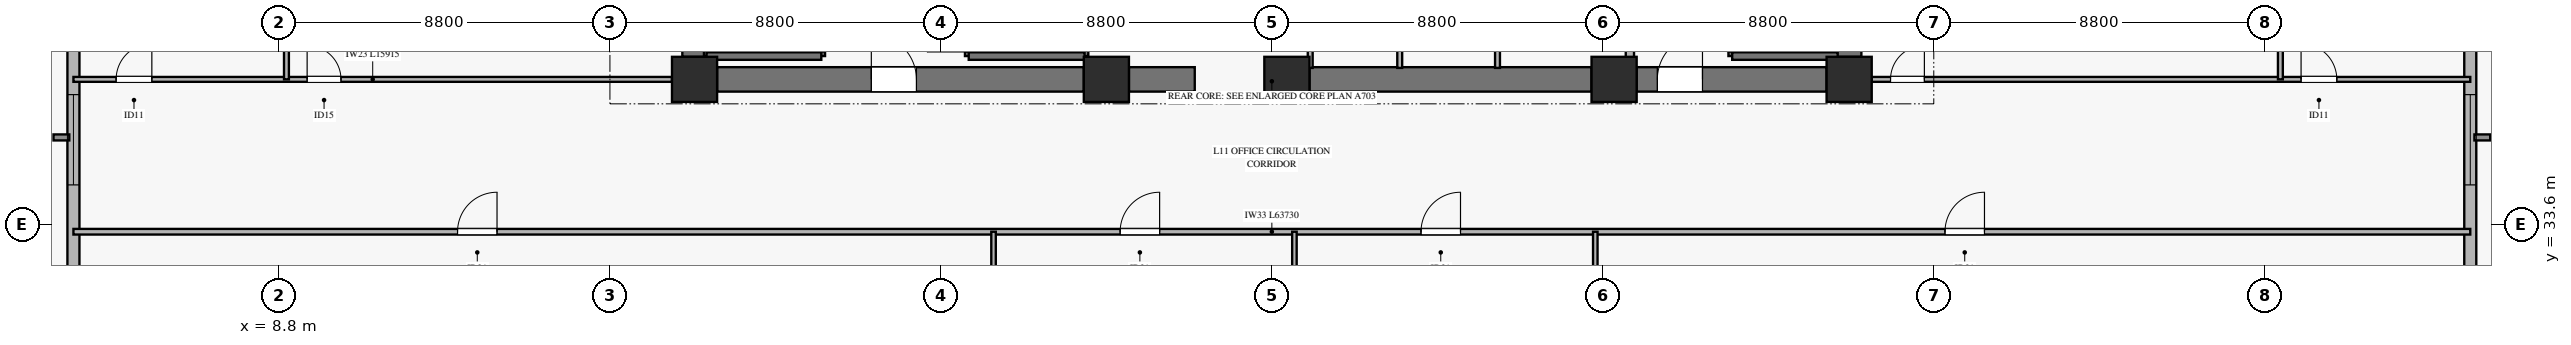
"""IFC4 building model, lengths in metres.
Left out: names, types, materials, properties, quantities, classifications, styles, units other than length and angle.
Written with IfcOpenShell. Run it as: python <this file> out.ifc"""

import sys

from ifc_helpers import new_model, si_unit, direction, frame, frame_2d, origin, origin_2d, place, context, subcontext, project, spatial, rectangle, extrude, source, transform, mapped, element, fill, save


model = new_model("IFC4")
c1 = context("Model", 3, precision=1e-05, world=origin(), true_north=direction((0.0, 1.0)))
c2 = subcontext(c1, "Body", "Model", "MODEL_VIEW")
j1 = project(units=[si_unit("LENGTHUNIT", "METRE"), si_unit("PLANEANGLEUNIT", "RADIAN")], contexts=[c1])
p1 = place(None, origin())
s1 = spatial("IfcSite", under=j1, at=p1, CompositionType="ELEMENT")
p2 = place(p1, origin())
s2 = spatial("IfcBuilding", under=s1, at=p2, CompositionType="ELEMENT")
p3 = place(p2, frame((0.0, 0.0, 44.9)))
s3 = spatial("IfcBuildingStorey", under=s2, at=p3, CompositionType="ELEMENT", Elevation=44.9)
m1 = source(origin(), c2, "Body", "SweptSolid", [
    extrude(rectangle(XDim=1.2, YDim=1.2, at=origin_2d()), origin(), (0.0, 0.0, 1.0), 3.62),
])
for number, where, z_axis, x_axis in (
    (1, (19.85, 37.45, 0.0), (0.0, 0.0, 1.0), (1.0, 0.0, 0.0)),
    (2, (30.8, 37.45, 0.0), (0.0, 0.0, 1.0), (1.0, 0.0, 0.0)),
    (3, (35.6, 37.45, 0.0), (0.0, 0.0, 1.0), (1.0, 0.0, 0.0)),
    (4, (44.3, 37.45, 0.0), (0.0, 0.0, 1.0), (1.0, 0.0, 0.0)),
    (5, (50.55, 37.45, 0.0), (0.0, 0.0, 1.0), (1.0, 0.0, 0.0)),
):
    element("IfcColumn", number, at=place(p3, frame(where, z_axis=z_axis, x_axis=x_axis)), inside=s3, PredefinedType="PILASTER", context=c2, shape_type="MappedRepresentation", body=[
        mapped(m1, transform((0.0, 0.0, 0.0), x_axis=(1.0, 0.0, 0.0), y_axis=(0.0, 1.0, 0.0), z_axis=(0.0, 0.0, 1.0), scale=1.0)),
    ])
p4 = place(p3, frame((20.45, 37.45, 0.0), z_axis=(0.0, 0.0, 1.0), x_axis=(1.0, 0.0, 0.0)))
e6 = element("IfcWall", 6, at=p4, inside=s3, PredefinedType="SHEAR", context=c2, shape_type="SweptSolid", body=[
    extrude(rectangle(XDim=9.75, YDim=0.65, at=frame_2d((4.875, 0.0))), origin(), (0.0, 0.0, 1.0), 3.62),
])
p5 = place(p4, frame((4.1, 0.0, 0.0)))
e7 = element("IfcOpeningElement", 7, at=p5, cuts=e6, PredefinedType="OPENING", context=c2, shape_type="SweptSolid", body=[
    extrude(rectangle(XDim=1.2, YDim=2.15, at=frame_2d((0.6, 1.075))), frame((0.0, 0.335, 0.0), z_axis=(0.0, -1.0, 0.0), x_axis=(1.0, 0.0, 0.0)), (0.0, 0.0, 1.0), 0.67),
])
p6 = place(p3, frame((31.4, 37.45, 0.0), z_axis=(0.0, 0.0, 1.0), x_axis=(1.0, 0.0, 0.0)))
e8 = element("IfcWall", 8, at=p6, inside=s3, PredefinedType="SHEAR", context=c2, shape_type="SweptSolid", body=[
    extrude(rectangle(XDim=1.75, YDim=0.65, at=frame_2d((0.875, 0.0))), origin(), (0.0, 0.0, 1.0), 3.62),
])
p7 = place(p3, frame((36.2, 37.45, 0.0), z_axis=(0.0, 0.0, 1.0), x_axis=(1.0, 0.0, 0.0)))
e9 = element("IfcWall", 9, at=p7, inside=s3, PredefinedType="SHEAR", context=c2, shape_type="SweptSolid", body=[
    extrude(rectangle(XDim=7.5, YDim=0.65, at=frame_2d((3.75, 0.0))), origin(), (0.0, 0.0, 1.0), 3.62),
])
p8 = place(p3, frame((44.9, 37.45, 0.0), z_axis=(0.0, 0.0, 1.0), x_axis=(1.0, 0.0, 0.0)))
e10 = element("IfcWall", 10, at=p8, inside=s3, PredefinedType="SHEAR", context=c2, shape_type="SweptSolid", body=[
    extrude(rectangle(XDim=5.05, YDim=0.65, at=frame_2d((2.525, 0.0))), origin(), (0.0, 0.0, 1.0), 3.62),
])
p9 = place(p8, frame((0.55, 0.0, 0.0)))
e11 = element("IfcOpeningElement", 11, at=p9, cuts=e10, PredefinedType="OPENING", context=c2, shape_type="SweptSolid", body=[
    extrude(rectangle(XDim=1.2, YDim=2.15, at=frame_2d((0.6, 1.075))), frame((0.0, 0.335, 0.0), z_axis=(0.0, -1.0, 0.0), x_axis=(1.0, 0.0, 0.0)), (0.0, 0.0, 1.0), 0.67),
])
for number, where, z_axis, x_axis in (
    (12, (19.85, 38.05, 0.0), (0.0, 0.0, 1.0), (0.0, 1.0, 0.0)),
    (13, (50.55, 38.05, 0.0), (0.0, 0.0, 1.0), (0.0, 1.0, 0.0)),
):
    element("IfcWall", number, at=place(p3, frame(where, z_axis=z_axis, x_axis=x_axis)), inside=s3, PredefinedType="SHEAR", context=c2, shape_type="SweptSolid", body=[
        extrude(rectangle(XDim=7.9, YDim=0.65, at=frame_2d((3.95, 0.0))), origin(), (0.0, 0.0, 1.0), 3.62),
    ])
p10 = place(p3, frame((3.335, 25.513, 0.0), z_axis=(0.0, 0.0, 1.0), x_axis=(0.0, 1.0, 0.0)))
e14 = element("IfcWall", 14, at=p10, inside=s3, PredefinedType="SOLIDWALL", context=c2, shape_type="SweptSolid", body=[
    extrude(rectangle(XDim=17.413, YDim=0.32, at=frame_2d((8.707, 0.0))), origin(), (0.0, 0.0, 1.0), 3.1),
])
p11 = place(p10, frame((9.132, 0.0, 0.45)))
e15 = element("IfcOpeningElement", 15, at=p11, cuts=e14, PredefinedType="OPENING", context=c2, shape_type="SweptSolid", body=[
    extrude(rectangle(XDim=2.4, YDim=2.1, at=frame_2d((1.2, 1.05))), frame((0.0, 0.17, 0.0), z_axis=(0.0, -1.0, 0.0), x_axis=(1.0, 0.0, 0.0)), (0.0, 0.0, 1.0), 0.34),
])
p12 = place(p3, frame((67.065, 25.513, 0.0), z_axis=(0.0, 0.0, 1.0), x_axis=(0.0, 1.0, 0.0)))
e16 = element("IfcWall", 16, at=p12, inside=s3, PredefinedType="SOLIDWALL", context=c2, shape_type="SweptSolid", body=[
    extrude(rectangle(XDim=17.413, YDim=0.32, at=frame_2d((8.707, 0.0))), origin(), (0.0, 0.0, 1.0), 3.1),
])
p13 = place(p12, frame((9.132, 0.0, 0.45)))
e17 = element("IfcOpeningElement", 17, at=p13, cuts=e16, PredefinedType="OPENING", context=c2, shape_type="SweptSolid", body=[
    extrude(rectangle(XDim=2.4, YDim=2.1, at=frame_2d((1.2, 1.05))), frame((0.0, 0.17, 0.0), z_axis=(0.0, -1.0, 0.0), x_axis=(1.0, 0.0, 0.0)), (0.0, 0.0, 1.0), 0.34),
])
p14 = place(p3, frame((20.17, 38.07, 0.0), z_axis=(0.0, 0.0, 1.0), x_axis=(0.0, 1.0, 0.0)))
e18 = element("IfcWall", 18, at=p14, inside=s3, PredefinedType="SOLIDWALL", context=c2, shape_type="SweptSolid", body=[
    extrude(rectangle(XDim=7.25, YDim=0.14, at=frame_2d((3.625, 0.0))), origin(), (0.0, 0.0, 1.0), 3.9),
])
p15 = place(p3, frame((23.22, 38.07, 0.0), z_axis=(0.0, 0.0, 1.0), x_axis=(0.0, 1.0, 0.0)))
e19 = element("IfcWall", 19, at=p15, inside=s3, PredefinedType="SOLIDWALL", context=c2, shape_type="SweptSolid", body=[
    extrude(rectangle(XDim=7.25, YDim=0.2, at=frame_2d((3.625, 0.0))), origin(), (0.0, 0.0, 1.0), 3.9),
])
p16 = place(p15, frame((0.11, 0.0, 0.0)))
e20 = element("IfcOpeningElement", 20, at=p16, cuts=e19, PredefinedType="OPENING", context=c2, shape_type="SweptSolid", body=[
    extrude(rectangle(XDim=1.1, YDim=2.15, at=frame_2d((0.55, 1.075))), frame((0.0, 0.11, 0.0), z_axis=(0.0, -1.0, 0.0), x_axis=(1.0, 0.0, 0.0)), (0.0, 0.0, 1.0), 0.22),
])
p17 = place(p3, frame((20.17, 38.07, 0.0), z_axis=(0.0, 0.0, 1.0), x_axis=(1.0, 0.0, 0.0)))
e21 = element("IfcWall", 21, at=p17, inside=s3, PredefinedType="SOLIDWALL", context=c2, shape_type="SweptSolid", body=[
    extrude(rectangle(XDim=3.05, YDim=0.2, at=frame_2d((1.525, 0.0))), origin(), (0.0, 0.0, 1.0), 3.9),
])
p18 = place(p3, frame((27.14, 38.07, 0.0), z_axis=(0.0, 0.0, 1.0), x_axis=(0.0, 1.0, 0.0)))
e22 = element("IfcWall", 22, at=p18, inside=s3, PredefinedType="SOLIDWALL", context=c2, shape_type="SweptSolid", body=[
    extrude(rectangle(XDim=7.25, YDim=0.2, at=frame_2d((3.625, 0.0))), origin(), (0.0, 0.0, 1.0), 3.9),
])
p19 = place(p18, frame((0.11, 0.0, 0.0)))
e23 = element("IfcOpeningElement", 23, at=p19, cuts=e22, PredefinedType="OPENING", context=c2, shape_type="SweptSolid", body=[
    extrude(rectangle(XDim=1.1, YDim=2.15, at=frame_2d((0.55, 1.075))), frame((0.0, 0.11, 0.0), z_axis=(0.0, -1.0, 0.0), x_axis=(1.0, 0.0, 0.0)), (0.0, 0.0, 1.0), 0.22),
])
p20 = place(p3, frame((30.22, 38.07, 0.0), z_axis=(0.0, 0.0, 1.0), x_axis=(0.0, 1.0, 0.0)))
e24 = element("IfcWall", 24, at=p20, inside=s3, PredefinedType="SOLIDWALL", context=c2, shape_type="SweptSolid", body=[
    extrude(rectangle(XDim=7.25, YDim=0.2, at=frame_2d((3.625, 0.0))), origin(), (0.0, 0.0, 1.0), 3.9),
])
p21 = place(p3, frame((27.14, 38.07, 0.0), z_axis=(0.0, 0.0, 1.0), x_axis=(1.0, 0.0, 0.0)))
e25 = element("IfcWall", 25, at=p21, inside=s3, PredefinedType="SOLIDWALL", context=c2, shape_type="SweptSolid", body=[
    extrude(rectangle(XDim=3.08, YDim=0.2, at=frame_2d((1.54, 0.0))), origin(), (0.0, 0.0, 1.0), 3.9),
])
p22 = place(p3, frame((47.44, 38.07, 0.0), z_axis=(0.0, 0.0, 1.0), x_axis=(0.0, 1.0, 0.0)))
e26 = element("IfcWall", 26, at=p22, inside=s3, PredefinedType="SOLIDWALL", context=c2, shape_type="SweptSolid", body=[
    extrude(rectangle(XDim=7.25, YDim=0.2, at=frame_2d((3.625, 0.0))), origin(), (0.0, 0.0, 1.0), 3.9),
])
p23 = place(p22, frame((0.11, 0.0, 0.0)))
e27 = element("IfcOpeningElement", 27, at=p23, cuts=e26, PredefinedType="OPENING", context=c2, shape_type="SweptSolid", body=[
    extrude(rectangle(XDim=1.1, YDim=2.15, at=frame_2d((0.55, 1.075))), frame((0.0, 0.11, 0.0), z_axis=(0.0, -1.0, 0.0), x_axis=(1.0, 0.0, 0.0)), (0.0, 0.0, 1.0), 0.22),
])
p24 = place(p3, frame((47.44, 38.07, 0.0), z_axis=(0.0, 0.0, 1.0), x_axis=(1.0, 0.0, 0.0)))
e28 = element("IfcWall", 28, at=p24, inside=s3, PredefinedType="SOLIDWALL", context=c2, shape_type="SweptSolid", body=[
    extrude(rectangle(XDim=2.805, YDim=0.2, at=frame_2d((1.403, 0.0))), origin(), (0.0, 0.0, 1.0), 3.9),
])
p25 = place(p3, frame((44.72, 37.755, 0.0), z_axis=(0.0, 0.0, 1.0), x_axis=(0.0, 1.0, 0.0)))
e29 = element("IfcWall", 29, at=p25, inside=s3, PredefinedType="SOLIDWALL", context=c2, shape_type="SweptSolid", body=[
    extrude(rectangle(XDim=7.465, YDim=0.22, at=frame_2d((3.732, 0.0))), origin(), (0.0, 0.0, 1.0), 3.62),
])
p26 = place(p3, frame((36.22, 37.755, 0.0), z_axis=(0.0, 0.0, 1.0), x_axis=(0.0, 1.0, 0.0)))
e30 = element("IfcWall", 30, at=p26, inside=s3, PredefinedType="PARTITIONING", context=c2, shape_type="SweptSolid", body=[
    extrude(rectangle(XDim=2.165, YDim=0.13, at=frame_2d((1.083, 0.0))), origin(), (0.0, 0.0, 1.0), 3.62),
])
p27 = place(p26, frame((0.855, 0.0, 0.0)))
e31 = element("IfcOpeningElement", 31, at=p27, cuts=e30, PredefinedType="OPENING", context=c2, shape_type="SweptSolid", body=[
    extrude(rectangle(XDim=0.9, YDim=2.1, at=frame_2d((0.45, 1.05))), frame((0.0, 0.075, 0.0), z_axis=(0.0, -1.0, 0.0), x_axis=(1.0, 0.0, 0.0)), (0.0, 0.0, 1.0), 0.15),
])
p28 = place(p3, frame((38.6, 37.755, 0.0), z_axis=(0.0, 0.0, 1.0), x_axis=(0.0, 1.0, 0.0)))
e32 = element("IfcWall", 32, at=p28, inside=s3, PredefinedType="PARTITIONING", context=c2, shape_type="SweptSolid", body=[
    extrude(rectangle(XDim=2.165, YDim=0.13, at=frame_2d((1.083, 0.0))), origin(), (0.0, 0.0, 1.0), 3.62),
])
p29 = place(p28, frame((0.565, 0.0, 0.0)))
e33 = element("IfcOpeningElement", 33, at=p29, cuts=e32, PredefinedType="OPENING", context=c2, shape_type="SweptSolid", body=[
    extrude(rectangle(XDim=0.9, YDim=2.1, at=frame_2d((0.45, 1.05))), frame((0.0, 0.075, 0.0), z_axis=(0.0, -1.0, 0.0), x_axis=(1.0, 0.0, 0.0)), (0.0, 0.0, 1.0), 0.15),
])
p30 = place(p3, frame((41.2, 37.755, 0.0), z_axis=(0.0, 0.0, 1.0), x_axis=(0.0, 1.0, 0.0)))
e34 = element("IfcWall", 34, at=p30, inside=s3, PredefinedType="PARTITIONING", context=c2, shape_type="SweptSolid", body=[
    extrude(rectangle(XDim=2.165, YDim=0.13, at=frame_2d((1.083, 0.0))), origin(), (0.0, 0.0, 1.0), 3.62),
])
p31 = place(p30, frame((0.565, 0.0, 0.0)))
e35 = element("IfcOpeningElement", 35, at=p31, cuts=e34, PredefinedType="OPENING", context=c2, shape_type="SweptSolid", body=[
    extrude(rectangle(XDim=0.9, YDim=2.1, at=frame_2d((0.45, 1.05))), frame((0.0, 0.075, 0.0), z_axis=(0.0, -1.0, 0.0), x_axis=(1.0, 0.0, 0.0)), (0.0, 0.0, 1.0), 0.15),
])
p32 = place(p3, frame((3.335, 33.4, 0.0), z_axis=(0.0, 0.0, 1.0), x_axis=(1.0, 0.0, 0.0)))
e36 = element("IfcWall", 36, at=p32, inside=s3, PredefinedType="PARTITIONING", context=c2, shape_type="SweptSolid", body=[
    extrude(rectangle(XDim=63.73, YDim=0.15, at=frame_2d((31.865, 0.0))), origin(), (0.0, 0.0, 1.0), 2.705),
])
p33 = place(p32, frame((10.213, 0.0, 0.0)))
e37 = element("IfcOpeningElement", 37, at=p33, cuts=e36, PredefinedType="OPENING", context=c2, shape_type="SweptSolid", body=[
    extrude(rectangle(XDim=1.05, YDim=2.15, at=frame_2d((0.525, 1.075))), frame((0.0, 0.085, 0.0), z_axis=(0.0, -1.0, 0.0), x_axis=(1.0, 0.0, 0.0)), (0.0, 0.0, 1.0), 0.17),
])
p34 = place(p32, frame((27.831, 0.0, 0.0)))
e38 = element("IfcOpeningElement", 38, at=p34, cuts=e36, PredefinedType="OPENING", context=c2, shape_type="SweptSolid", body=[
    extrude(rectangle(XDim=1.05, YDim=2.15, at=frame_2d((0.525, 1.075))), frame((0.0, 0.085, 0.0), z_axis=(0.0, -1.0, 0.0), x_axis=(1.0, 0.0, 0.0)), (0.0, 0.0, 1.0), 0.17),
])
p35 = place(p32, frame((35.831, 0.0, 0.0)))
e39 = element("IfcOpeningElement", 39, at=p35, cuts=e36, PredefinedType="OPENING", context=c2, shape_type="SweptSolid", body=[
    extrude(rectangle(XDim=1.05, YDim=2.15, at=frame_2d((0.525, 1.075))), frame((0.0, 0.085, 0.0), z_axis=(0.0, -1.0, 0.0), x_axis=(1.0, 0.0, 0.0)), (0.0, 0.0, 1.0), 0.17),
])
p36 = place(p32, frame((49.763, 0.0, 0.0)))
e40 = element("IfcOpeningElement", 40, at=p36, cuts=e36, PredefinedType="OPENING", context=c2, shape_type="SweptSolid", body=[
    extrude(rectangle(XDim=1.05, YDim=2.15, at=frame_2d((0.525, 1.075))), frame((0.0, 0.085, 0.0), z_axis=(0.0, -1.0, 0.0), x_axis=(1.0, 0.0, 0.0)), (0.0, 0.0, 1.0), 0.17),
])
for number, where, z_axis, x_axis in (
    (41, (27.8, 3.827, 0.0), (0.0, 0.0, 1.0), (0.0, 1.0, 0.0)),
    (42, (35.8, 3.827, 0.0), (0.0, 0.0, 1.0), (0.0, 1.0, 0.0)),
):
    element("IfcWall", number, at=place(p3, frame(where, z_axis=z_axis, x_axis=x_axis)), inside=s3, PredefinedType="PARTITIONING", context=c2, shape_type="SweptSolid", body=[
        extrude(rectangle(XDim=29.573, YDim=0.12, at=frame_2d((14.787, 0.0))), origin(), (0.0, 0.0, 1.0), 3.105),
    ])
p37 = place(p3, frame((43.8, 3.827, 0.0), z_axis=(0.0, 0.0, 1.0), x_axis=(0.0, 1.0, 0.0)))
e43 = element("IfcWall", 43, at=p37, inside=s3, PredefinedType="PARTITIONING", context=c2, shape_type="SweptSolid", body=[
    extrude(rectangle(XDim=29.573, YDim=0.12, at=frame_2d((14.787, 0.0))), origin(), (0.0, 0.0, 1.0), 3.155),
])
p38 = place(p3, frame((3.335, 37.45, 0.0), z_axis=(0.0, 0.0, 1.0), x_axis=(1.0, 0.0, 0.0)))
e44 = element("IfcWall", 44, at=p38, inside=s3, PredefinedType="PARTITIONING", context=c2, shape_type="SweptSolid", body=[
    extrude(rectangle(XDim=15.915, YDim=0.13, at=frame_2d((7.958, 0.0))), origin(), (0.0, 0.0, 1.0), 3.105),
])
p39 = place(p38, frame((1.135, 0.0, 0.0)))
e45 = element("IfcOpeningElement", 45, at=p39, cuts=e44, PredefinedType="OPENING", context=c2, shape_type="SweptSolid", body=[
    extrude(rectangle(XDim=0.95, YDim=2.1, at=frame_2d((0.475, 1.05))), frame((0.0, 0.075, 0.0), z_axis=(0.0, -1.0, 0.0), x_axis=(1.0, 0.0, 0.0)), (0.0, 0.0, 1.0), 0.15),
])
p40 = place(p38, frame((6.214, 0.0, 0.0)))
e46 = element("IfcOpeningElement", 46, at=p40, cuts=e44, PredefinedType="OPENING", context=c2, shape_type="SweptSolid", body=[
    extrude(rectangle(XDim=0.9, YDim=2.1, at=frame_2d((0.45, 1.05))), frame((0.0, 0.075, 0.0), z_axis=(0.0, -1.0, 0.0), x_axis=(1.0, 0.0, 0.0)), (0.0, 0.0, 1.0), 0.15),
])
p41 = place(p3, frame((8.999, 37.45, 0.0), z_axis=(0.0, 0.0, 1.0), x_axis=(0.0, 1.0, 0.0)))
e47 = element("IfcWall", 47, at=p41, inside=s3, PredefinedType="PARTITIONING", context=c2, shape_type="SweptSolid", body=[
    extrude(rectangle(XDim=8.8, YDim=0.13, at=frame_2d((4.4, 0.0))), origin(), (0.0, 0.0, 1.0), 3.62),
])
p42 = place(p3, frame((51.15, 37.45, 0.0), z_axis=(0.0, 0.0, 1.0), x_axis=(1.0, 0.0, 0.0)))
e48 = element("IfcWall", 48, at=p42, inside=s3, PredefinedType="PARTITIONING", context=c2, shape_type="SweptSolid", body=[
    extrude(rectangle(XDim=15.915, YDim=0.13, at=frame_2d((7.958, 0.0))), origin(), (0.0, 0.0, 1.0), 3.105),
])
p43 = place(p42, frame((0.5, 0.0, 0.0)))
e49 = element("IfcOpeningElement", 49, at=p43, cuts=e48, PredefinedType="OPENING", context=c2, shape_type="SweptSolid", body=[
    extrude(rectangle(XDim=0.9, YDim=2.1, at=frame_2d((0.45, 1.05))), frame((0.0, 0.075, 0.0), z_axis=(0.0, -1.0, 0.0), x_axis=(1.0, 0.0, 0.0)), (0.0, 0.0, 1.0), 0.15),
])
p44 = place(p42, frame((11.416, 0.0, 0.0)))
e50 = element("IfcOpeningElement", 50, at=p44, cuts=e48, PredefinedType="OPENING", context=c2, shape_type="SweptSolid", body=[
    extrude(rectangle(XDim=0.95, YDim=2.1, at=frame_2d((0.475, 1.05))), frame((0.0, 0.075, 0.0), z_axis=(0.0, -1.0, 0.0), x_axis=(1.0, 0.0, 0.0)), (0.0, 0.0, 1.0), 0.15),
])
p45 = place(p3, frame((62.016, 37.45, 0.0), z_axis=(0.0, 0.0, 1.0), x_axis=(0.0, 1.0, 0.0)))
e51 = element("IfcWall", 51, at=p45, inside=s3, PredefinedType="PARTITIONING", context=c2, shape_type="SweptSolid", body=[
    extrude(rectangle(XDim=8.8, YDim=0.13, at=frame_2d((4.4, 0.0))), origin(), (0.0, 0.0, 1.0), 3.62),
])
m2 = source(origin(), c2, "Body", "SweptSolid", [
    extrude(rectangle(XDim=2.4, YDim=2.1, at=frame_2d((1.2, 1.05))), frame((0.0, 0.03, 0.0), z_axis=(0.0, -1.0, 0.0), x_axis=(1.0, 0.0, 0.0)), (0.0, 0.0, 1.0), 0.06),
])
p46 = place(p11, origin())
e52 = element("IfcWindow", 52, at=p46, inside=s3, PartitioningType="SINGLE_PANEL", PredefinedType="WINDOW", context=c2, shape_type="MappedRepresentation", body=[
    mapped(m2, transform((0.0, 0.0, 0.0), x_axis=(1.0, 0.0, 0.0), y_axis=(0.0, 1.0, 0.0), z_axis=(0.0, 0.0, 1.0), scale=1.0)),
])
fill(e15, e52)
p47 = place(p13, origin())
e53 = element("IfcWindow", 53, at=p47, inside=s3, PartitioningType="SINGLE_PANEL", PredefinedType="WINDOW", context=c2, shape_type="MappedRepresentation", body=[
    mapped(m2, transform((0.0, 0.0, 0.0), x_axis=(1.0, 0.0, 0.0), y_axis=(0.0, 1.0, 0.0), z_axis=(0.0, 0.0, 1.0), scale=1.0)),
])
fill(e17, e53)
m3 = source(origin(), c2, "Body", "SweptSolid", [
    extrude(rectangle(XDim=1.2, YDim=2.15, at=frame_2d((0.6, 1.075))), frame((0.0, 0.025, 0.0), z_axis=(0.0, -1.0, 0.0), x_axis=(1.0, 0.0, 0.0)), (0.0, 0.0, 1.0), 0.05),
])
p48 = place(p5, origin())
e54 = element("IfcDoor", 54, at=p48, inside=s3, OperationType="SINGLE_SWING_LEFT", PredefinedType="DOOR", context=c2, shape_type="MappedRepresentation", body=[
    mapped(m3, transform((0.0, 0.0, 0.0), x_axis=(1.0, 0.0, 0.0), y_axis=(0.0, 1.0, 0.0), z_axis=(0.0, 0.0, 1.0), scale=1.0)),
])
fill(e7, e54)
p49 = place(p9, origin())
e55 = element("IfcDoor", 55, at=p49, inside=s3, OperationType="SINGLE_SWING_RIGHT", PredefinedType="DOOR", context=c2, shape_type="MappedRepresentation", body=[
    mapped(m3, transform((0.0, 0.0, 0.0), x_axis=(1.0, 0.0, 0.0), y_axis=(0.0, 1.0, 0.0), z_axis=(0.0, 0.0, 1.0), scale=1.0)),
])
fill(e11, e55)
m4 = source(origin(), c2, "Body", "SweptSolid", [
    extrude(rectangle(XDim=1.05, YDim=2.15, at=frame_2d((0.525, 1.075))), frame((0.0, 0.025, 0.0), z_axis=(0.0, -1.0, 0.0), x_axis=(1.0, 0.0, 0.0)), (0.0, 0.0, 1.0), 0.05),
])
p50 = place(p33, origin())
e56 = element("IfcDoor", 56, at=p50, inside=s3, OperationType="SINGLE_SWING_RIGHT", PredefinedType="DOOR", context=c2, shape_type="MappedRepresentation", body=[
    mapped(m4, transform((0.0, 0.0, 0.0), x_axis=(1.0, 0.0, 0.0), y_axis=(0.0, 1.0, 0.0), z_axis=(0.0, 0.0, 1.0), scale=1.0)),
])
fill(e37, e56)
p51 = place(p34, origin())
e57 = element("IfcDoor", 57, at=p51, inside=s3, OperationType="SINGLE_SWING_RIGHT", PredefinedType="DOOR", context=c2, shape_type="MappedRepresentation", body=[
    mapped(m4, transform((0.0, 0.0, 0.0), x_axis=(1.0, 0.0, 0.0), y_axis=(0.0, 1.0, 0.0), z_axis=(0.0, 0.0, 1.0), scale=1.0)),
])
fill(e38, e57)
p52 = place(p35, origin())
e58 = element("IfcDoor", 58, at=p52, inside=s3, OperationType="SINGLE_SWING_RIGHT", PredefinedType="DOOR", context=c2, shape_type="MappedRepresentation", body=[
    mapped(m4, transform((0.0, 0.0, 0.0), x_axis=(1.0, 0.0, 0.0), y_axis=(0.0, 1.0, 0.0), z_axis=(0.0, 0.0, 1.0), scale=1.0)),
])
fill(e39, e58)
p53 = place(p36, origin())
e59 = element("IfcDoor", 59, at=p53, inside=s3, OperationType="SINGLE_SWING_RIGHT", PredefinedType="DOOR", context=c2, shape_type="MappedRepresentation", body=[
    mapped(m4, transform((0.0, 0.0, 0.0), x_axis=(1.0, 0.0, 0.0), y_axis=(0.0, 1.0, 0.0), z_axis=(0.0, 0.0, 1.0), scale=1.0)),
])
fill(e40, e59)
m5 = source(origin(), c2, "Body", "SweptSolid", [
    extrude(rectangle(XDim=0.95, YDim=2.1, at=frame_2d((0.475, 1.05))), frame((0.0, 0.025, 0.0), z_axis=(0.0, -1.0, 0.0), x_axis=(1.0, 0.0, 0.0)), (0.0, 0.0, 1.0), 0.05),
])
p54 = place(p39, origin())
e60 = element("IfcDoor", 60, at=p54, inside=s3, OperationType="SINGLE_SWING_RIGHT", PredefinedType="DOOR", context=c2, shape_type="MappedRepresentation", body=[
    mapped(m5, transform((0.0, 0.0, 0.0), x_axis=(1.0, 0.0, 0.0), y_axis=(0.0, 1.0, 0.0), z_axis=(0.0, 0.0, 1.0), scale=1.0)),
])
fill(e45, e60)
m6 = source(origin(), c2, "Body", "SweptSolid", [
    extrude(rectangle(XDim=0.9, YDim=2.1, at=frame_2d((0.45, 1.05))), frame((0.0, 0.025, 0.0), z_axis=(0.0, -1.0, 0.0), x_axis=(1.0, 0.0, 0.0)), (0.0, 0.0, 1.0), 0.05),
])
p55 = place(p40, origin())
e61 = element("IfcDoor", 61, at=p55, inside=s3, OperationType="SINGLE_SWING_LEFT", PredefinedType="DOOR", context=c2, shape_type="MappedRepresentation", body=[
    mapped(m6, transform((0.0, 0.0, 0.0), x_axis=(1.0, 0.0, 0.0), y_axis=(0.0, 1.0, 0.0), z_axis=(0.0, 0.0, 1.0), scale=1.0)),
])
fill(e46, e61)
p56 = place(p43, origin())
e62 = element("IfcDoor", 62, at=p56, inside=s3, OperationType="SINGLE_SWING_RIGHT", PredefinedType="DOOR", context=c2, shape_type="MappedRepresentation", body=[
    mapped(m6, transform((0.0, 0.0, 0.0), x_axis=(1.0, 0.0, 0.0), y_axis=(0.0, 1.0, 0.0), z_axis=(0.0, 0.0, 1.0), scale=1.0)),
])
fill(e49, e62)
p57 = place(p44, origin())
e63 = element("IfcDoor", 63, at=p57, inside=s3, OperationType="SINGLE_SWING_LEFT", PredefinedType="DOOR", context=c2, shape_type="MappedRepresentation", body=[
    mapped(m5, transform((0.0, 0.0, 0.0), x_axis=(1.0, 0.0, 0.0), y_axis=(0.0, 1.0, 0.0), z_axis=(0.0, 0.0, 1.0), scale=1.0)),
])
fill(e50, e63)
save(model, sys.argv[1])
